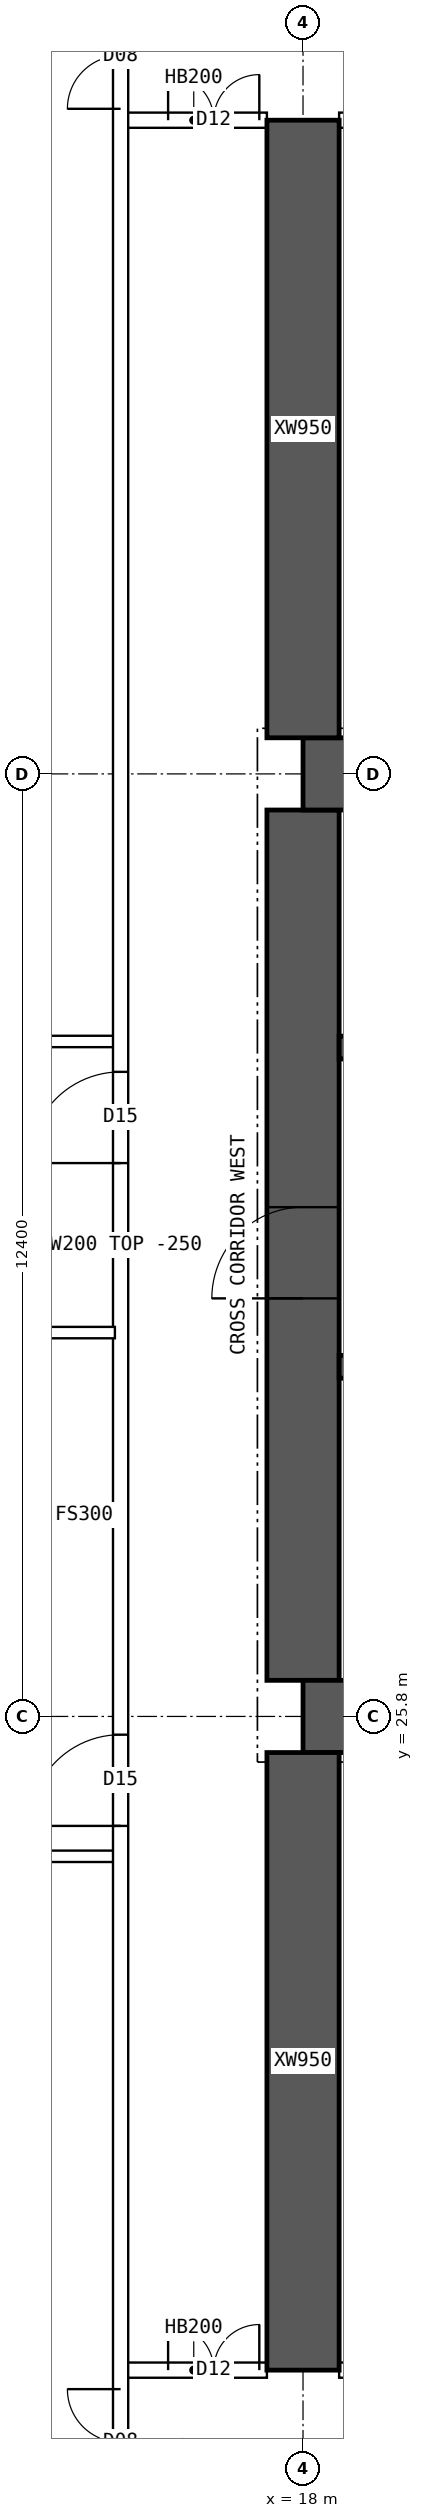
"""IFC4 building model, lengths in metres.
Left out: names, types, materials, properties, quantities, classifications, styles, units other than length and angle.
Written with IfcOpenShell. Run it as: python <this file> out.ifc"""

import sys

from ifc_helpers import new_model, si_unit, direction, frame, frame_2d, origin, place, context, subcontext, project, spatial, polyline, rectangle, outline, extrude, element, fill, save


model = new_model("IFC4")
c1 = context("Model", 3, precision=1e-05, world=origin(), true_north=direction((0.0, 1.0)))
c2 = subcontext(c1, "Body", "Model", "MODEL_VIEW")
j1 = project(units=[si_unit("LENGTHUNIT", "METRE"), si_unit("PLANEANGLEUNIT", "RADIAN")], contexts=[c1])
p1 = place(None, origin())
s1 = spatial("IfcSite", under=j1, at=p1, CompositionType="ELEMENT")
p2 = place(p1, origin())
s2 = spatial("IfcBuilding", under=s1, at=p2, CompositionType="ELEMENT")
p3 = place(p2, frame((0.0, 0.0, 140.35)))
s3 = spatial("IfcBuildingStorey", under=s2, at=p3, CompositionType="ELEMENT", Elevation=140.35)
for number, where, z_axis, x_axis in (
    (1, (18.0, 25.8, 0.0), (0.0, 0.0, 1.0), (1.0, 0.0, 0.0)),
    (2, (18.0, 38.2, 0.0), (0.0, 0.0, 1.0), (1.0, 0.0, 0.0)),
):
    element("IfcWall", number, at=place(p3, frame(where, z_axis=z_axis, x_axis=x_axis)), inside=s3, PredefinedType="SHEAR", context=c2, shape_type="SweptSolid", body=[
        extrude(rectangle(XDim=48.0, YDim=0.95, at=frame_2d((24.0, 0.0))), origin(), (0.0, 0.0, 1.0), 4.5),
    ])
p4 = place(p3, frame((18.0, 26.275, 0.0), z_axis=(0.0, 0.0, 1.0), x_axis=(0.0, 1.0, 0.0)))
e3 = element("IfcWall", 3, at=p4, inside=s3, PredefinedType="SHEAR", context=c2, shape_type="SweptSolid", body=[
    extrude(rectangle(XDim=11.45, YDim=0.95, at=frame_2d((5.725, 0.0))), origin(), (0.0, 0.0, 1.0), 4.5),
])
p5 = place(p4, frame((5.025, 0.0, 0.0)))
e4 = element("IfcOpeningElement", 4, at=p5, cuts=e3, PredefinedType="OPENING", context=c2, shape_type="SweptSolid", body=[
    extrude(rectangle(XDim=1.2, YDim=2.1, at=frame_2d((0.6, 1.05))), frame((0.0, 0.485, 0.0), z_axis=(0.0, -1.0, 0.0), x_axis=(1.0, 0.0, 0.0)), (0.0, 0.0, 1.0), 0.97),
])
p6 = place(p3, frame((18.475, 30.4, 0.0), z_axis=(0.0, 0.0, 1.0), x_axis=(1.0, 0.0, 0.0)))
e5 = element("IfcWall", 5, at=p6, inside=s3, PredefinedType="SHEAR", context=c2, shape_type="SweptSolid", body=[
    extrude(rectangle(XDim=47.05, YDim=0.3, at=frame_2d((23.525, 0.0))), origin(), (0.0, 0.0, 1.0), 4.5),
])
p7 = place(p6, frame((0.4, 0.0, 0.0)))
e6 = element("IfcOpeningElement", 6, at=p7, cuts=e5, PredefinedType="OPENING", context=c2, shape_type="SweptSolid", body=[
    extrude(rectangle(XDim=1.0, YDim=2.1, at=frame_2d((0.5, 1.05))), frame((0.0, 0.16, 0.0), z_axis=(0.0, -1.0, 0.0), x_axis=(1.0, 0.0, 0.0)), (0.0, 0.0, 1.0), 0.32),
])
p8 = place(p6, frame((45.65, 0.0, 0.0)))
e7 = element("IfcOpeningElement", 7, at=p8, cuts=e5, PredefinedType="OPENING", context=c2, shape_type="SweptSolid", body=[
    extrude(rectangle(XDim=1.0, YDim=2.1, at=frame_2d((0.5, 1.05))), frame((0.0, 0.16, 0.0), z_axis=(0.0, -1.0, 0.0), x_axis=(1.0, 0.0, 0.0)), (0.0, 0.0, 1.0), 0.32),
])
p9 = place(p6, frame((8.275, 0.0, 0.0)))
e8 = element("IfcOpeningElement", 8, at=p9, cuts=e5, PredefinedType="OPENING", context=c2, shape_type="SweptSolid", body=[
    extrude(rectangle(XDim=1.1, YDim=2.1, at=frame_2d((0.55, 1.05))), frame((0.0, 0.16, 0.0), z_axis=(0.0, -1.0, 0.0), x_axis=(1.0, 0.0, 0.0)), (0.0, 0.0, 1.0), 0.32),
])
p10 = place(p6, frame((10.875, 0.0, 0.0)))
e9 = element("IfcOpeningElement", 9, at=p10, cuts=e5, PredefinedType="OPENING", context=c2, shape_type="SweptSolid", body=[
    extrude(rectangle(XDim=1.1, YDim=2.1, at=frame_2d((0.55, 1.05))), frame((0.0, 0.16, 0.0), z_axis=(0.0, -1.0, 0.0), x_axis=(1.0, 0.0, 0.0)), (0.0, 0.0, 1.0), 0.32),
])
p11 = place(p6, frame((13.475, 0.0, 0.0)))
e10 = element("IfcOpeningElement", 10, at=p11, cuts=e5, PredefinedType="OPENING", context=c2, shape_type="SweptSolid", body=[
    extrude(rectangle(XDim=1.1, YDim=2.1, at=frame_2d((0.55, 1.05))), frame((0.0, 0.16, 0.0), z_axis=(0.0, -1.0, 0.0), x_axis=(1.0, 0.0, 0.0)), (0.0, 0.0, 1.0), 0.32),
])
p12 = place(p6, frame((16.075, 0.0, 0.0)))
e11 = element("IfcOpeningElement", 11, at=p12, cuts=e5, PredefinedType="OPENING", context=c2, shape_type="SweptSolid", body=[
    extrude(rectangle(XDim=1.1, YDim=2.1, at=frame_2d((0.55, 1.05))), frame((0.0, 0.16, 0.0), z_axis=(0.0, -1.0, 0.0), x_axis=(1.0, 0.0, 0.0)), (0.0, 0.0, 1.0), 0.32),
])
p13 = place(p6, frame((18.85, 0.0, 0.0)))
e12 = element("IfcOpeningElement", 12, at=p13, cuts=e5, PredefinedType="OPENING", context=c2, shape_type="SweptSolid", body=[
    extrude(rectangle(XDim=0.9, YDim=2.1, at=frame_2d((0.45, 1.05))), frame((0.0, 0.16, 0.0), z_axis=(0.0, -1.0, 0.0), x_axis=(1.0, 0.0, 0.0)), (0.0, 0.0, 1.0), 0.32),
])
p14 = place(p6, frame((21.5, 0.0, 0.0)))
e13 = element("IfcOpeningElement", 13, at=p14, cuts=e5, PredefinedType="OPENING", context=c2, shape_type="SweptSolid", body=[
    extrude(rectangle(XDim=1.1, YDim=2.1, at=frame_2d((0.55, 1.05))), frame((0.0, 0.16, 0.0), z_axis=(0.0, -1.0, 0.0), x_axis=(1.0, 0.0, 0.0)), (0.0, 0.0, 1.0), 0.32),
])
p15 = place(p6, frame((30.142, 0.0, 0.0)))
e14 = element("IfcOpeningElement", 14, at=p15, cuts=e5, PredefinedType="OPENING", context=c2, shape_type="SweptSolid", body=[
    extrude(rectangle(XDim=1.1, YDim=2.1, at=frame_2d((0.55, 1.05))), frame((0.0, 0.16, 0.0), z_axis=(0.0, -1.0, 0.0), x_axis=(1.0, 0.0, 0.0)), (0.0, 0.0, 1.0), 0.32),
])
p16 = place(p6, frame((33.675, 0.0, 0.0)))
e15 = element("IfcOpeningElement", 15, at=p16, cuts=e5, PredefinedType="OPENING", context=c2, shape_type="SweptSolid", body=[
    extrude(rectangle(XDim=1.1, YDim=2.1, at=frame_2d((0.55, 1.05))), frame((0.0, 0.16, 0.0), z_axis=(0.0, -1.0, 0.0), x_axis=(1.0, 0.0, 0.0)), (0.0, 0.0, 1.0), 0.32),
])
p17 = place(p6, frame((37.208, 0.0, 0.0)))
e16 = element("IfcOpeningElement", 16, at=p17, cuts=e5, PredefinedType="OPENING", context=c2, shape_type="SweptSolid", body=[
    extrude(rectangle(XDim=1.1, YDim=2.1, at=frame_2d((0.55, 1.05))), frame((0.0, 0.16, 0.0), z_axis=(0.0, -1.0, 0.0), x_axis=(1.0, 0.0, 0.0)), (0.0, 0.0, 1.0), 0.32),
])
p18 = place(p3, frame((18.475, 34.6, 0.0), z_axis=(0.0, 0.0, 1.0), x_axis=(1.0, 0.0, 0.0)))
e17 = element("IfcWall", 17, at=p18, inside=s3, PredefinedType="SHEAR", context=c2, shape_type="SweptSolid", body=[
    extrude(rectangle(XDim=47.05, YDim=0.3, at=frame_2d((23.525, 0.0))), origin(), (0.0, 0.0, 1.0), 4.5),
])
p19 = place(p18, frame((0.9, 0.0, 0.0)))
e18 = element("IfcOpeningElement", 18, at=p19, cuts=e17, PredefinedType="OPENING", context=c2, shape_type="SweptSolid", body=[
    extrude(rectangle(XDim=1.1, YDim=2.1, at=frame_2d((0.55, 1.05))), frame((0.0, 0.16, 0.0), z_axis=(0.0, -1.0, 0.0), x_axis=(1.0, 0.0, 0.0)), (0.0, 0.0, 1.0), 0.32),
])
p20 = place(p18, frame((45.05, 0.0, 0.0)))
e19 = element("IfcOpeningElement", 19, at=p20, cuts=e17, PredefinedType="OPENING", context=c2, shape_type="SweptSolid", body=[
    extrude(rectangle(XDim=1.1, YDim=2.1, at=frame_2d((0.55, 1.05))), frame((0.0, 0.16, 0.0), z_axis=(0.0, -1.0, 0.0), x_axis=(1.0, 0.0, 0.0)), (0.0, 0.0, 1.0), 0.32),
])
p21 = place(p18, frame((4.125, 0.0, 0.0)))
e20 = element("IfcOpeningElement", 20, at=p21, cuts=e17, PredefinedType="OPENING", context=c2, shape_type="SweptSolid", body=[
    extrude(rectangle(XDim=0.9, YDim=2.1, at=frame_2d((0.45, 1.05))), frame((0.0, 0.16, 0.0), z_axis=(0.0, -1.0, 0.0), x_axis=(1.0, 0.0, 0.0)), (0.0, 0.0, 1.0), 0.32),
])
p22 = place(p18, frame((42.025, 0.0, 0.0)))
e21 = element("IfcOpeningElement", 21, at=p22, cuts=e17, PredefinedType="OPENING", context=c2, shape_type="SweptSolid", body=[
    extrude(rectangle(XDim=0.9, YDim=2.1, at=frame_2d((0.45, 1.05))), frame((0.0, 0.16, 0.0), z_axis=(0.0, -1.0, 0.0), x_axis=(1.0, 0.0, 0.0)), (0.0, 0.0, 1.0), 0.32),
])
p23 = place(p18, frame((8.9, 0.0, 0.0)))
e22 = element("IfcOpeningElement", 22, at=p23, cuts=e17, PredefinedType="OPENING", context=c2, shape_type="SweptSolid", body=[
    extrude(rectangle(XDim=0.9, YDim=2.1, at=frame_2d((0.45, 1.05))), frame((0.0, 0.16, 0.0), z_axis=(0.0, -1.0, 0.0), x_axis=(1.0, 0.0, 0.0)), (0.0, 0.0, 1.0), 0.32),
])
p24 = place(p18, frame((12.874, 0.0, 0.0)))
e23 = element("IfcOpeningElement", 23, at=p24, cuts=e17, PredefinedType="OPENING", context=c2, shape_type="SweptSolid", body=[
    extrude(rectangle(XDim=0.9, YDim=2.1, at=frame_2d((0.45, 1.05))), frame((0.0, 0.16, 0.0), z_axis=(0.0, -1.0, 0.0), x_axis=(1.0, 0.0, 0.0)), (0.0, 0.0, 1.0), 0.32),
])
p25 = place(p18, frame((16.521, 0.0, 0.0)))
e24 = element("IfcOpeningElement", 24, at=p25, cuts=e17, PredefinedType="OPENING", context=c2, shape_type="SweptSolid", body=[
    extrude(rectangle(XDim=0.9, YDim=2.1, at=frame_2d((0.45, 1.05))), frame((0.0, 0.16, 0.0), z_axis=(0.0, -1.0, 0.0), x_axis=(1.0, 0.0, 0.0)), (0.0, 0.0, 1.0), 0.32),
])
p26 = place(p18, frame((20.28, 0.0, 0.0)))
e25 = element("IfcOpeningElement", 25, at=p26, cuts=e17, PredefinedType="OPENING", context=c2, shape_type="SweptSolid", body=[
    extrude(rectangle(XDim=0.9, YDim=2.1, at=frame_2d((0.45, 1.05))), frame((0.0, 0.16, 0.0), z_axis=(0.0, -1.0, 0.0), x_axis=(1.0, 0.0, 0.0)), (0.0, 0.0, 1.0), 0.32),
])
p27 = place(p18, frame((24.686, 0.0, 0.0)))
e26 = element("IfcOpeningElement", 26, at=p27, cuts=e17, PredefinedType="OPENING", context=c2, shape_type="SweptSolid", body=[
    extrude(rectangle(XDim=0.9, YDim=2.1, at=frame_2d((0.45, 1.05))), frame((0.0, 0.16, 0.0), z_axis=(0.0, -1.0, 0.0), x_axis=(1.0, 0.0, 0.0)), (0.0, 0.0, 1.0), 0.32),
])
p28 = place(p18, frame((27.483, 0.0, 0.0)))
e27 = element("IfcOpeningElement", 27, at=p28, cuts=e17, PredefinedType="OPENING", context=c2, shape_type="SweptSolid", body=[
    extrude(rectangle(XDim=0.9, YDim=2.1, at=frame_2d((0.45, 1.05))), frame((0.0, 0.16, 0.0), z_axis=(0.0, -1.0, 0.0), x_axis=(1.0, 0.0, 0.0)), (0.0, 0.0, 1.0), 0.32),
])
p29 = place(p18, frame((30.666, 0.0, 0.0)))
e28 = element("IfcOpeningElement", 28, at=p29, cuts=e17, PredefinedType="OPENING", context=c2, shape_type="SweptSolid", body=[
    extrude(rectangle(XDim=0.9, YDim=2.1, at=frame_2d((0.45, 1.05))), frame((0.0, 0.16, 0.0), z_axis=(0.0, -1.0, 0.0), x_axis=(1.0, 0.0, 0.0)), (0.0, 0.0, 1.0), 0.32),
])
p30 = place(p18, frame((34.617, 0.0, 0.0)))
e29 = element("IfcOpeningElement", 29, at=p30, cuts=e17, PredefinedType="OPENING", context=c2, shape_type="SweptSolid", body=[
    extrude(rectangle(XDim=0.9, YDim=2.1, at=frame_2d((0.45, 1.05))), frame((0.0, 0.16, 0.0), z_axis=(0.0, -1.0, 0.0), x_axis=(1.0, 0.0, 0.0)), (0.0, 0.0, 1.0), 0.32),
])
p31 = place(p18, frame((37.555, 0.0, 0.0)))
e30 = element("IfcOpeningElement", 30, at=p31, cuts=e17, PredefinedType="OPENING", context=c2, shape_type="SweptSolid", body=[
    extrude(rectangle(XDim=0.9, YDim=2.1, at=frame_2d((0.45, 1.05))), frame((0.0, 0.16, 0.0), z_axis=(0.0, -1.0, 0.0), x_axis=(1.0, 0.0, 0.0)), (0.0, 0.0, 1.0), 0.32),
])
for number, where, z_axis, x_axis in (
    (31, (18.0, 17.2, 0.0), (0.0, 0.0, 1.0), (0.0, 1.0, 0.0)),
    (32, (18.0, 38.675, 0.0), (0.0, 0.0, 1.0), (0.0, 1.0, 0.0)),
):
    element("IfcWall", number, at=place(p3, frame(where, z_axis=z_axis, x_axis=x_axis)), inside=s3, PredefinedType="SHEAR", context=c2, shape_type="SweptSolid", body=[
        extrude(rectangle(XDim=8.125, YDim=0.95, at=frame_2d((4.062, 0.0))), origin(), (0.0, 0.0, 1.0), 4.5),
    ])
p32 = place(p3, frame((15.6, 17.2, 0.0), z_axis=(0.0, 0.0, 1.0), x_axis=(1.0, 0.0, 0.0)))
e33 = element("IfcWall", 33, at=p32, inside=s3, PredefinedType="SOLIDWALL", context=c2, shape_type="SweptSolid", body=[
    extrude(rectangle(XDim=1.925, YDim=0.2, at=frame_2d((0.962, 0.0))), origin(), (0.0, 0.0, 1.0), 4.25),
])
p33 = place(p32, frame((0.625, 0.0, 0.0)))
e34 = element("IfcOpeningElement", 34, at=p33, cuts=e33, PredefinedType="OPENING", context=c2, shape_type="SweptSolid", body=[
    extrude(rectangle(XDim=1.2, YDim=2.1, at=frame_2d((0.6, 1.05))), frame((0.0, 0.11, 0.0), z_axis=(0.0, -1.0, 0.0), x_axis=(1.0, 0.0, 0.0)), (0.0, 0.0, 1.0), 0.22),
])
p34 = place(p3, frame((18.475, 17.2, 0.0), z_axis=(0.0, 0.0, 1.0), x_axis=(1.0, 0.0, 0.0)))
e35 = element("IfcWall", 35, at=p34, inside=s3, PredefinedType="SOLIDWALL", context=c2, shape_type="SweptSolid", body=[
    extrude(rectangle(XDim=5.05, YDim=0.2, at=frame_2d((2.525, 0.0))), origin(), (0.0, 0.0, 1.0), 4.25),
])
p35 = place(p34, frame((0.8, 0.0, 0.0)))
e36 = element("IfcOpeningElement", 36, at=p35, cuts=e35, PredefinedType="OPENING", context=c2, shape_type="SweptSolid", body=[
    extrude(rectangle(XDim=1.0, YDim=2.1, at=frame_2d((0.5, 1.05))), frame((0.0, 0.11, 0.0), z_axis=(0.0, -1.0, 0.0), x_axis=(1.0, 0.0, 0.0)), (0.0, 0.0, 1.0), 0.22),
])
p36 = place(p3, frame((15.6, 46.8, 0.0), z_axis=(0.0, 0.0, 1.0), x_axis=(1.0, 0.0, 0.0)))
e37 = element("IfcWall", 37, at=p36, inside=s3, PredefinedType="SOLIDWALL", context=c2, shape_type="SweptSolid", body=[
    extrude(rectangle(XDim=1.925, YDim=0.2, at=frame_2d((0.962, 0.0))), origin(), (0.0, 0.0, 1.0), 4.25),
])
p37 = place(p36, frame((0.625, 0.0, 0.0)))
e38 = element("IfcOpeningElement", 38, at=p37, cuts=e37, PredefinedType="OPENING", context=c2, shape_type="SweptSolid", body=[
    extrude(rectangle(XDim=1.2, YDim=2.1, at=frame_2d((0.6, 1.05))), frame((0.0, 0.11, 0.0), z_axis=(0.0, -1.0, 0.0), x_axis=(1.0, 0.0, 0.0)), (0.0, 0.0, 1.0), 0.22),
])
p38 = place(p3, frame((18.475, 46.8, 0.0), z_axis=(0.0, 0.0, 1.0), x_axis=(1.0, 0.0, 0.0)))
e39 = element("IfcWall", 39, at=p38, inside=s3, PredefinedType="SOLIDWALL", context=c2, shape_type="SweptSolid", body=[
    extrude(rectangle(XDim=5.05, YDim=0.2, at=frame_2d((2.525, 0.0))), origin(), (0.0, 0.0, 1.0), 4.25),
])
p39 = place(p38, frame((0.8, 0.0, 0.0)))
e40 = element("IfcOpeningElement", 40, at=p39, cuts=e39, PredefinedType="OPENING", context=c2, shape_type="SweptSolid", body=[
    extrude(rectangle(XDim=1.0, YDim=2.1, at=frame_2d((0.5, 1.05))), frame((0.0, 0.11, 0.0), z_axis=(0.0, -1.0, 0.0), x_axis=(1.0, 0.0, 0.0)), (0.0, 0.0, 1.0), 0.22),
])
p40 = place(p3, frame((8.705, 30.85, 0.0), z_axis=(0.0, 0.0, 1.0), x_axis=(1.0, 0.0, 0.0)))
e41 = element("IfcWall", 41, at=p40, inside=s3, PredefinedType="PARTITIONING", context=c2, shape_type="SweptSolid", body=[
    extrude(outline(polyline([(0.0, 0.0), (6.82, 0.0), (6.82, 4.25), (3.597, 4.25), (3.595, 3.8), (2.997, 3.8), (2.995, 4.25), (0.0, 4.25), (0.0, 0.0)])), frame((0.0, 0.075, 0.0), z_axis=(0.0, -1.0, 0.0), x_axis=(1.0, 0.0, 0.0)), (0.0, 0.0, 1.0), 0.15),
])
p41 = place(p3, frame((15.6, 10.446, 0.0), z_axis=(0.0, 0.0, 1.0), x_axis=(0.0, 1.0, 0.0)))
e42 = element("IfcWall", 42, at=p41, inside=s3, PredefinedType="SOLIDWALL", context=c2, shape_type="SweptSolid", body=[
    extrude(rectangle(XDim=43.107, YDim=0.2, at=frame_2d((21.554, 0.0))), origin(), (0.0, 0.0, 1.0), 4.25),
])
p42 = place(p41, frame((13.914, 0.0, 0.0)))
e43 = element("IfcOpeningElement", 43, at=p42, cuts=e42, PredefinedType="OPENING", context=c2, shape_type="SweptSolid", body=[
    extrude(rectangle(XDim=1.2, YDim=2.1, at=frame_2d((0.6, 1.05))), frame((0.0, 0.11, 0.0), z_axis=(0.0, -1.0, 0.0), x_axis=(1.0, 0.0, 0.0)), (0.0, 0.0, 1.0), 0.22),
])
p43 = place(p41, frame((22.634, 0.0, 0.0)))
e44 = element("IfcOpeningElement", 44, at=p43, cuts=e42, PredefinedType="OPENING", context=c2, shape_type="SweptSolid", body=[
    extrude(rectangle(XDim=1.2, YDim=2.1, at=frame_2d((0.6, 1.05))), frame((0.0, 0.11, 0.0), z_axis=(0.0, -1.0, 0.0), x_axis=(1.0, 0.0, 0.0)), (0.0, 0.0, 1.0), 0.22),
])
p44 = place(p41, frame((5.104, 0.0, 0.0)))
e45 = element("IfcOpeningElement", 45, at=p44, cuts=e42, PredefinedType="OPENING", context=c2, shape_type="SweptSolid", body=[
    extrude(rectangle(XDim=1.4, YDim=2.1, at=frame_2d((0.7, 1.05))), frame((0.0, 0.11, 0.0), z_axis=(0.0, -1.0, 0.0), x_axis=(1.0, 0.0, 0.0)), (0.0, 0.0, 1.0), 0.22),
])
p45 = place(p41, frame((36.504, 0.0, 0.0)))
e46 = element("IfcOpeningElement", 46, at=p45, cuts=e42, PredefinedType="OPENING", context=c2, shape_type="SweptSolid", body=[
    extrude(rectangle(XDim=1.4, YDim=2.1, at=frame_2d((0.7, 1.05))), frame((0.0, 0.11, 0.0), z_axis=(0.0, -1.0, 0.0), x_axis=(1.0, 0.0, 0.0)), (0.0, 0.0, 1.0), 0.22),
])
p46 = place(p3, frame((8.705, 23.96, 0.0), z_axis=(0.0, 0.0, 1.0), x_axis=(1.0, 0.0, 0.0)))
e47 = element("IfcWall", 47, at=p46, inside=s3, PredefinedType="PARTITIONING", context=c2, shape_type="SweptSolid", body=[
    extrude(rectangle(XDim=6.82, YDim=0.15, at=frame_2d((3.41, 0.0))), origin(), (0.0, 0.0, 1.0), 4.25),
])
p47 = place(p3, frame((8.705, 34.68, 0.0), z_axis=(0.0, 0.0, 1.0), x_axis=(1.0, 0.0, 0.0)))
e48 = element("IfcWall", 48, at=p47, inside=s3, PredefinedType="PARTITIONING", context=c2, shape_type="SweptSolid", body=[
    extrude(outline(polyline([(0.0, 0.0), (6.82, 0.0), (6.82, 4.25), (3.597, 4.25), (3.595, 3.8), (2.997, 3.8), (2.995, 4.25), (0.0, 4.25), (0.0, 0.0)])), frame((0.0, 0.075, 0.0), z_axis=(0.0, -1.0, 0.0), x_axis=(1.0, 0.0, 0.0)), (0.0, 0.0, 1.0), 0.15),
])
p48 = place(p5, origin())
e49 = element("IfcDoor", 49, at=p48, inside=s3, OperationType="SINGLE_SWING_LEFT", PredefinedType="DOOR", context=c2, shape_type="SweptSolid", body=[
    extrude(rectangle(XDim=1.2, YDim=2.1, at=frame_2d((0.6, 1.05))), frame((0.0, 0.025, 0.0), z_axis=(0.0, -1.0, 0.0), x_axis=(1.0, 0.0, 0.0)), (0.0, 0.0, 1.0), 0.05),
])
fill(e4, e49)
p49 = place(p33, origin())
e50 = element("IfcDoor", 50, at=p49, inside=s3, OperationType="DOUBLE_DOOR_SINGLE_SWING", PredefinedType="DOOR", context=c2, shape_type="SweptSolid", body=[
    extrude(rectangle(XDim=1.2, YDim=2.1, at=frame_2d((0.6, 1.05))), frame((0.0, 0.025, 0.0), z_axis=(0.0, -1.0, 0.0), x_axis=(1.0, 0.0, 0.0)), (0.0, 0.0, 1.0), 0.05),
])
fill(e34, e50)
p50 = place(p37, origin())
e51 = element("IfcDoor", 51, at=p50, inside=s3, OperationType="DOUBLE_DOOR_SINGLE_SWING", PredefinedType="DOOR", context=c2, shape_type="SweptSolid", body=[
    extrude(rectangle(XDim=1.2, YDim=2.1, at=frame_2d((0.6, 1.05))), frame((0.0, 0.025, 0.0), z_axis=(0.0, -1.0, 0.0), x_axis=(1.0, 0.0, 0.0)), (0.0, 0.0, 1.0), 0.05),
])
fill(e38, e51)
p51 = place(p42, origin())
e52 = element("IfcDoor", 52, at=p51, inside=s3, OperationType="SINGLE_SWING_LEFT", PredefinedType="DOOR", context=c2, shape_type="SweptSolid", body=[
    extrude(rectangle(XDim=1.2, YDim=2.1, at=frame_2d((0.6, 1.05))), frame((0.0, 0.025, 0.0), z_axis=(0.0, -1.0, 0.0), x_axis=(1.0, 0.0, 0.0)), (0.0, 0.0, 1.0), 0.05),
])
fill(e43, e52)
p52 = place(p43, origin())
e53 = element("IfcDoor", 53, at=p52, inside=s3, OperationType="SINGLE_SWING_LEFT", PredefinedType="DOOR", context=c2, shape_type="SweptSolid", body=[
    extrude(rectangle(XDim=1.2, YDim=2.1, at=frame_2d((0.6, 1.05))), frame((0.0, 0.025, 0.0), z_axis=(0.0, -1.0, 0.0), x_axis=(1.0, 0.0, 0.0)), (0.0, 0.0, 1.0), 0.05),
])
fill(e44, e53)
p53 = place(p44, origin())
e54 = element("IfcDoor", 54, at=p53, inside=s3, OperationType="DOUBLE_DOOR_SINGLE_SWING", PredefinedType="DOOR", context=c2, shape_type="SweptSolid", body=[
    extrude(rectangle(XDim=1.4, YDim=2.1, at=frame_2d((0.7, 1.05))), frame((0.0, 0.025, 0.0), z_axis=(0.0, -1.0, 0.0), x_axis=(1.0, 0.0, 0.0)), (0.0, 0.0, 1.0), 0.05),
])
fill(e45, e54)
p54 = place(p45, origin())
e55 = element("IfcDoor", 55, at=p54, inside=s3, OperationType="DOUBLE_DOOR_SINGLE_SWING", PredefinedType="DOOR", context=c2, shape_type="SweptSolid", body=[
    extrude(rectangle(XDim=1.4, YDim=2.1, at=frame_2d((0.7, 1.05))), frame((0.0, 0.025, 0.0), z_axis=(0.0, -1.0, 0.0), x_axis=(1.0, 0.0, 0.0)), (0.0, 0.0, 1.0), 0.05),
])
fill(e46, e55)
save(model, sys.argv[1])
